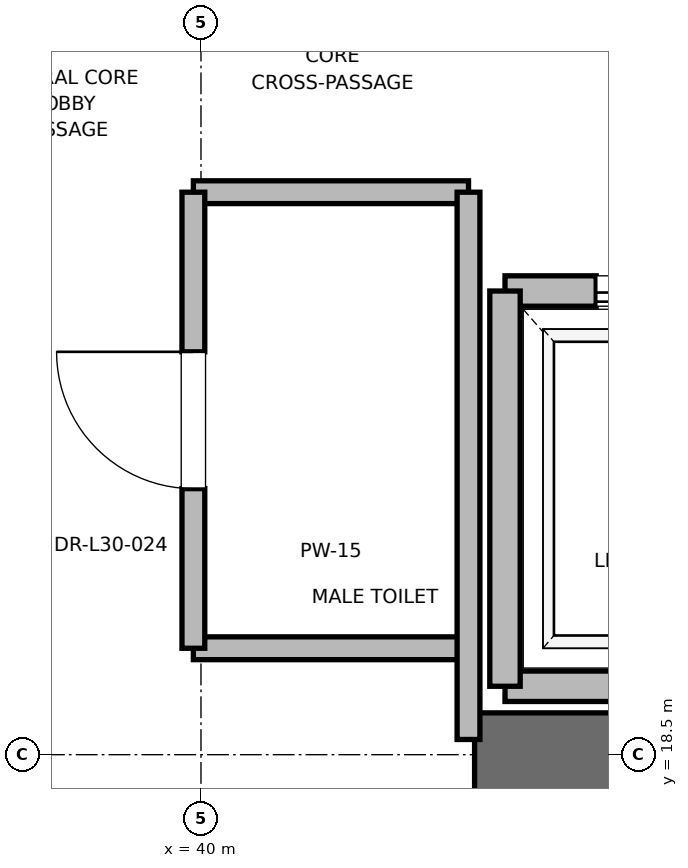
"""IFC4 building model, lengths in metres.
Left out: names, types, materials, properties, quantities, classifications, styles, units other than length and angle.
Written with IfcOpenShell. Run it as: python <this file> out.ifc"""

import sys

from ifc_helpers import new_model, si_unit, direction, frame, frame_2d, origin, place, context, subcontext, project, spatial, rectangle, extrude, element, fill, save


model = new_model("IFC4")
c1 = context("Model", 3, precision=1e-05, world=origin(), true_north=direction((0.0, 1.0)))
c2 = subcontext(c1, "Body", "Model", "MODEL_VIEW")
j1 = project(units=[si_unit("LENGTHUNIT", "METRE"), si_unit("PLANEANGLEUNIT", "RADIAN")], contexts=[c1])
p1 = place(None, origin())
s1 = spatial("IfcSite", under=j1, at=p1, CompositionType="ELEMENT")
p2 = place(p1, origin())
s2 = spatial("IfcBuilding", under=s1, at=p2, CompositionType="ELEMENT")
p3 = place(p2, frame((0.0, 0.0, 132.4)))
s3 = spatial("IfcBuildingStorey", under=s2, at=p3, CompositionType="ELEMENT", Elevation=132.4)
p4 = place(p3, frame((41.8, 18.5, 0.0), z_axis=(0.0, 0.0, 1.0), x_axis=(1.0, 0.0, 0.0)))
e1 = element("IfcWall", 1, at=p4, inside=s3, PredefinedType="SHEAR", context=c2, shape_type="SweptSolid", body=[
    extrude(rectangle(XDim=9.2, YDim=0.55, at=frame_2d((4.6, 0.0))), origin(), (0.0, 0.0, 1.0), 3.775),
])
p5 = place(p3, frame((42.0, 18.95, 0.0), z_axis=(0.0, 0.0, 1.0), x_axis=(1.0, 0.0, 0.0)))
e2 = element("IfcWall", 2, at=p5, inside=s3, PredefinedType="SOLIDWALL", context=c2, shape_type="SweptSolid", body=[
    extrude(rectangle(XDim=2.3, YDim=0.2, at=frame_2d((1.15, 0.0))), origin(), (0.0, 0.0, 1.0), 2.755),
])
p6 = place(p3, frame((44.3, 21.55, 0.0), z_axis=(0.0, 0.0, 1.0), x_axis=(-1.0, 0.0, 0.0)))
e3 = element("IfcWall", 3, at=p6, inside=s3, PredefinedType="SOLIDWALL", context=c2, shape_type="SweptSolid", body=[
    extrude(rectangle(XDim=2.3, YDim=0.2, at=frame_2d((1.15, 0.0))), origin(), (0.0, 0.0, 1.0), 3.775),
])
p7 = place(p6, frame((0.6, 0.0, 0.0)))
e4 = element("IfcOpeningElement", 4, at=p7, cuts=e3, PredefinedType="OPENING", context=c2, shape_type="SweptSolid", body=[
    extrude(rectangle(XDim=1.1, YDim=2.2, at=frame_2d((0.55, 1.1))), frame((0.0, 0.1, 0.0), z_axis=(0.0, -1.0, 0.0), x_axis=(1.0, 0.0, 0.0)), (0.0, 0.0, 1.0), 0.2),
])
p8 = place(p3, frame((42.0, 21.55, 0.0), z_axis=(0.0, 0.0, 1.0), x_axis=(0.0, -1.0, 0.0)))
e5 = element("IfcWall", 5, at=p8, inside=s3, PredefinedType="SOLIDWALL", context=c2, shape_type="SweptSolid", body=[
    extrude(rectangle(XDim=2.6, YDim=0.2, at=frame_2d((1.3, 0.0))), origin(), (0.0, 0.0, 1.0), 2.755),
])
for number, where, z_axis, x_axis in (
    (6, (39.95, 19.2, 0.0), (0.0, 0.0, 1.0), (1.0, 0.0, 0.0)),
    (7, (39.95, 22.2, 0.0), (0.0, 0.0, 1.0), (1.0, 0.0, 0.0)),
):
    element("IfcWall", number, at=place(p3, frame(where, z_axis=z_axis, x_axis=x_axis)), inside=s3, PredefinedType="PARTITIONING", context=c2, shape_type="SweptSolid", body=[
        extrude(rectangle(XDim=1.81, YDim=0.15, at=frame_2d((0.905, 0.0))), origin(), (0.0, 0.0, 1.0), 2.85),
    ])
p9 = place(p3, frame((41.76, 18.6, 0.0), z_axis=(0.0, 0.0, 1.0), x_axis=(0.0, 1.0, 0.0)))
e8 = element("IfcWall", 8, at=p9, inside=s3, PredefinedType="PARTITIONING", context=c2, shape_type="SweptSolid", body=[
    extrude(rectangle(XDim=3.6, YDim=0.15, at=frame_2d((1.8, 0.0))), origin(), (0.0, 0.0, 1.0), 2.755),
])
p10 = place(p3, frame((39.95, 19.2, 0.0), z_axis=(0.0, 0.0, 1.0), x_axis=(0.0, 1.0, 0.0)))
e9 = element("IfcWall", 9, at=p10, inside=s3, PredefinedType="PARTITIONING", context=c2, shape_type="SweptSolid", body=[
    extrude(rectangle(XDim=3.0, YDim=0.15, at=frame_2d((1.5, 0.0))), origin(), (0.0, 0.0, 1.0), 2.85),
])
p11 = place(p10, frame((1.05, 0.0, 0.0)))
e10 = element("IfcOpeningElement", 10, at=p11, cuts=e9, PredefinedType="OPENING", context=c2, shape_type="SweptSolid", body=[
    extrude(rectangle(XDim=0.9, YDim=2.1, at=frame_2d((0.45, 1.05))), frame((0.0, 0.075, 0.0), z_axis=(0.0, -1.0, 0.0), x_axis=(1.0, 0.0, 0.0)), (0.0, 0.0, 1.0), 0.15),
])
p12 = place(p7, origin())
e11 = element("IfcDoor", 11, at=p12, inside=s3, OperationType="SLIDING_TO_RIGHT", PredefinedType="DOOR", context=c2, shape_type="SweptSolid", body=[
    extrude(rectangle(XDim=1.1, YDim=2.2, at=frame_2d((0.55, 1.1))), frame((0.0, 0.025, 0.0), z_axis=(0.0, -1.0, 0.0), x_axis=(1.0, 0.0, 0.0)), (0.0, 0.0, 1.0), 0.05),
])
fill(e4, e11)
p13 = place(p11, origin())
e12 = element("IfcDoor", 12, at=p13, inside=s3, OperationType="SINGLE_SWING_RIGHT", PredefinedType="DOOR", context=c2, shape_type="SweptSolid", body=[
    extrude(rectangle(XDim=0.9, YDim=2.1, at=frame_2d((0.45, 1.05))), frame((0.0, 0.025, 0.0), z_axis=(0.0, -1.0, 0.0), x_axis=(1.0, 0.0, 0.0)), (0.0, 0.0, 1.0), 0.05),
])
fill(e10, e12)
save(model, sys.argv[1])
